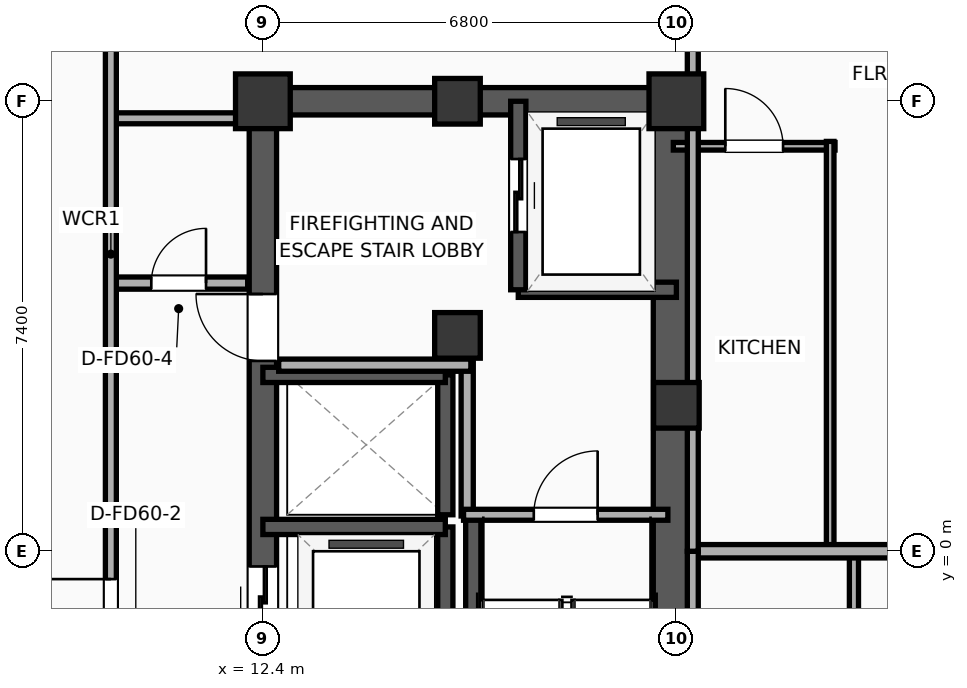
"""IFC4 building model, lengths in metres.
Left out: names, types, materials, properties, quantities, classifications, styles, units other than length and angle.
Written with IfcOpenShell. Run it as: python <this file> out.ifc"""

import sys

from ifc_helpers import new_model, si_unit, direction, frame, frame_2d, origin, origin_2d, place, context, subcontext, project, spatial, rectangle, extrude, element, fill, save


model = new_model("IFC4")
c1 = context("Model", 3, precision=1e-05, world=origin(), true_north=direction((0.0, 1.0)))
c2 = subcontext(c1, "Body", "Model", "MODEL_VIEW")
j1 = project(units=[si_unit("LENGTHUNIT", "METRE"), si_unit("PLANEANGLEUNIT", "RADIAN")], contexts=[c1])
p1 = place(None, origin())
s1 = spatial("IfcSite", under=j1, at=p1, CompositionType="ELEMENT")
p2 = place(p1, origin())
s2 = spatial("IfcBuilding", under=s1, at=p2, CompositionType="ELEMENT")
p3 = place(p2, frame((0.0, 0.0, 171.6)))
s3 = spatial("IfcBuildingStorey", under=s2, at=p3, CompositionType="ELEMENT", Elevation=171.6)
p4 = place(p3, frame((15.6, 3.55, 0.0), z_axis=(0.0, 0.0, 1.0), x_axis=(1.0, 0.0, 0.0)))
e1 = element("IfcColumn", 1, at=p4, inside=s3, PredefinedType="COLUMN", context=c2, shape_type="SweptSolid", body=[
    extrude(rectangle(XDim=0.75, YDim=0.75, at=origin_2d()), origin(), (0.0, 0.0, 1.0), 3.9),
])
p5 = place(p3, frame((12.4, 7.4, 0.0), z_axis=(0.0, 0.0, 1.0), x_axis=(1.0, 0.0, 0.0)))
e2 = element("IfcColumn", 2, at=p5, inside=s3, PredefinedType="COLUMN", context=c2, shape_type="SweptSolid", body=[
    extrude(rectangle(XDim=0.9, YDim=0.9, at=origin_2d()), origin(), (0.0, 0.0, 1.0), 3.9),
])
for number, where, z_axis, x_axis in (
    (3, (15.6, 7.4, 0.0), (0.0, 0.0, 1.0), (1.0, 0.0, 0.0)),
    (4, (19.2, 2.4, 0.0), (0.0, 0.0, 1.0), (1.0, 0.0, 0.0)),
):
    element("IfcColumn", number, at=place(p3, frame(where, z_axis=z_axis, x_axis=x_axis)), inside=s3, PredefinedType="COLUMN", context=c2, shape_type="SweptSolid", body=[
        extrude(rectangle(XDim=0.75, YDim=0.75, at=origin_2d()), origin(), (0.0, 0.0, 1.0), 3.9),
    ])
p6 = place(p3, frame((19.2, 7.4, 0.0), z_axis=(0.0, 0.0, 1.0), x_axis=(1.0, 0.0, 0.0)))
e5 = element("IfcColumn", 5, at=p6, inside=s3, PredefinedType="COLUMN", context=c2, shape_type="SweptSolid", body=[
    extrude(rectangle(XDim=0.9, YDim=0.9, at=origin_2d()), origin(), (0.0, 0.0, 1.0), 3.9),
])
p7 = place(p3, frame((12.175, 7.4, 0.0), z_axis=(0.0, 0.0, 1.0), x_axis=(1.0, 0.0, 0.0)))
e6 = element("IfcWall", 6, at=p7, inside=s3, PredefinedType="SHEAR", context=c2, shape_type="SweptSolid", body=[
    extrude(rectangle(XDim=7.25, YDim=0.45, at=frame_2d((3.625, 0.0))), origin(), (0.0, 0.0, 1.0), 3.65),
])
p8 = place(p3, frame((12.4, -7.4, 0.0), z_axis=(0.0, 0.0, 1.0), x_axis=(0.0, 1.0, 0.0)))
e7 = element("IfcWall", 7, at=p8, inside=s3, PredefinedType="SHEAR", context=c2, shape_type="SweptSolid", body=[
    extrude(rectangle(XDim=14.8, YDim=0.45, at=frame_2d((7.4, 0.0))), origin(), (0.0, 0.0, 1.0), 3.65),
])
p9 = place(p8, frame((3.45, 0.0, 0.0)))
e8 = element("IfcOpeningElement", 8, at=p9, cuts=e7, PredefinedType="OPENING", context=c2, shape_type="SweptSolid", body=[
    extrude(rectangle(XDim=1.1, YDim=2.05, at=frame_2d((0.55, 1.025))), frame((0.0, 0.235, 0.0), z_axis=(0.0, -1.0, 0.0), x_axis=(1.0, 0.0, 0.0)), (0.0, 0.0, 1.0), 0.47),
])
p10 = place(p8, frame((6.05, 0.0, 0.0)))
e9 = element("IfcOpeningElement", 9, at=p10, cuts=e7, PredefinedType="OPENING", context=c2, shape_type="SweptSolid", body=[
    extrude(rectangle(XDim=1.1, YDim=2.05, at=frame_2d((0.55, 1.025))), frame((0.0, 0.235, 0.0), z_axis=(0.0, -1.0, 0.0), x_axis=(1.0, 0.0, 0.0)), (0.0, 0.0, 1.0), 0.47),
])
p11 = place(p8, frame((10.53, 0.0, 0.0)))
e10 = element("IfcOpeningElement", 10, at=p11, cuts=e7, PredefinedType="OPENING", context=c2, shape_type="SweptSolid", body=[
    extrude(rectangle(XDim=1.1, YDim=2.05, at=frame_2d((0.55, 1.025))), frame((0.0, 0.235, 0.0), z_axis=(0.0, -1.0, 0.0), x_axis=(1.0, 0.0, 0.0)), (0.0, 0.0, 1.0), 0.47),
])
p12 = place(p8, frame((1.0, 0.0, 0.0)))
e11 = element("IfcOpeningElement", 11, at=p12, cuts=e7, PredefinedType="OPENING", context=c2, shape_type="SweptSolid", body=[
    extrude(rectangle(XDim=0.9, YDim=2.05, at=frame_2d((0.45, 1.025))), frame((0.0, 0.235, 0.0), z_axis=(0.0, -1.0, 0.0), x_axis=(1.0, 0.0, 0.0)), (0.0, 0.0, 1.0), 0.47),
])
p13 = place(p3, frame((19.145, -7.4, 0.0), z_axis=(0.0, 0.0, 1.0), x_axis=(0.0, 1.0, 0.0)))
e12 = element("IfcWall", 12, at=p13, inside=s3, PredefinedType="SHEAR", context=c2, shape_type="SweptSolid", body=[
    extrude(rectangle(XDim=14.8, YDim=0.65, at=frame_2d((7.4, 0.0))), origin(), (0.0, 0.0, 1.0), 3.65),
])
p14 = place(p3, frame((15.86, -7.085, 0.0), z_axis=(0.0, 0.0, 1.0), x_axis=(0.0, 1.0, 0.0)))
e13 = element("IfcWall", 13, at=p14, inside=s3, PredefinedType="SOLIDWALL", context=c2, shape_type="SweptSolid", body=[
    extrude(rectangle(XDim=7.685, YDim=0.25, at=frame_2d((3.843, 0.0))), origin(), (0.0, 0.0, 1.0), 3.65),
])
p15 = place(p3, frame((16.6, 4.3, 0.0), z_axis=(0.0, 0.0, 1.0), x_axis=(1.0, 0.0, 0.0)))
e14 = element("IfcWall", 14, at=p15, inside=s3, PredefinedType="SOLIDWALL", context=c2, shape_type="SweptSolid", body=[
    extrude(rectangle(XDim=2.6, YDim=0.25, at=frame_2d((1.3, 0.0))), origin(), (0.0, 0.0, 1.0), 3.65),
])
p16 = place(p3, frame((16.6, 7.4, 0.0), z_axis=(0.0, 0.0, 1.0), x_axis=(0.0, -1.0, 0.0)))
e15 = element("IfcWall", 15, at=p16, inside=s3, PredefinedType="SOLIDWALL", context=c2, shape_type="SweptSolid", body=[
    extrude(rectangle(XDim=3.1, YDim=0.25, at=frame_2d((1.55, 0.0))), origin(), (0.0, 0.0, 1.0), 3.65),
])
p17 = place(p16, frame((0.95, 0.0, 0.0)))
e16 = element("IfcOpeningElement", 16, at=p17, cuts=e15, PredefinedType="OPENING", context=c2, shape_type="SweptSolid", body=[
    extrude(rectangle(XDim=1.2, YDim=2.05, at=frame_2d((0.6, 1.025))), frame((0.0, 0.135, 0.0), z_axis=(0.0, -1.0, 0.0), x_axis=(1.0, 0.0, 0.0)), (0.0, 0.0, 1.0), 0.27),
])
p18 = place(p3, frame((15.4, -2.0, 0.0), z_axis=(0.0, 0.0, 1.0), x_axis=(0.0, 1.0, 0.0)))
e17 = element("IfcWall", 17, at=p18, inside=s3, PredefinedType="SOLIDWALL", context=c2, shape_type="SweptSolid", body=[
    extrude(rectangle(XDim=2.4, YDim=0.25, at=frame_2d((1.2, 0.0))), origin(), (0.0, 0.0, 1.0), 3.65),
])
p19 = place(p3, frame((15.4, 0.4, 0.0), z_axis=(0.0, 0.0, 1.0), x_axis=(-1.0, 0.0, 0.0)))
e18 = element("IfcWall", 18, at=p19, inside=s3, PredefinedType="SOLIDWALL", context=c2, shape_type="SweptSolid", body=[
    extrude(rectangle(XDim=3.0, YDim=0.25, at=frame_2d((1.5, 0.0))), origin(), (0.0, 0.0, 1.0), 3.65),
])
p20 = place(p3, frame((15.4, 0.6, 0.0), z_axis=(0.0, 0.0, 1.0), x_axis=(0.0, 1.0, 0.0)))
e19 = element("IfcWall", 19, at=p20, inside=s3, PredefinedType="SOLIDWALL", context=c2, shape_type="SweptSolid", body=[
    extrude(rectangle(XDim=2.3, YDim=0.25, at=frame_2d((1.15, 0.0))), origin(), (0.0, 0.0, 1.0), 3.65),
])
p21 = place(p3, frame((15.4, 2.9, 0.0), z_axis=(0.0, 0.0, 1.0), x_axis=(-1.0, 0.0, 0.0)))
e20 = element("IfcWall", 20, at=p21, inside=s3, PredefinedType="SOLIDWALL", context=c2, shape_type="SweptSolid", body=[
    extrude(rectangle(XDim=3.0, YDim=0.25, at=frame_2d((1.5, 0.0))), origin(), (0.0, 0.0, 1.0), 3.65),
])
p22 = place(p3, frame((15.76, 0.58, 0.0), z_axis=(0.0, 0.0, 1.0), x_axis=(0.0, 1.0, 0.0)))
e21 = element("IfcWall", 21, at=p22, inside=s3, PredefinedType="PARTITIONING", context=c2, shape_type="SweptSolid", body=[
    extrude(rectangle(XDim=2.52, YDim=0.2, at=frame_2d((1.26, 0.0))), origin(), (0.0, 0.0, 1.0), 3.65),
])
p23 = place(p3, frame((12.66, 3.06, 0.0), z_axis=(0.0, 0.0, 1.0), x_axis=(1.0, 0.0, 0.0)))
e22 = element("IfcWall", 22, at=p23, inside=s3, PredefinedType="PARTITIONING", context=c2, shape_type="SweptSolid", body=[
    extrude(rectangle(XDim=3.16, YDim=0.2, at=frame_2d((1.58, 0.0))), origin(), (0.0, 0.0, 1.0), 3.65),
])
p24 = place(p3, frame((15.7, 0.6, 0.0), z_axis=(0.0, 0.0, 1.0), x_axis=(1.0, 0.0, 0.0)))
e23 = element("IfcWall", 23, at=p24, inside=s3, PredefinedType="PARTITIONING", context=c2, shape_type="SweptSolid", body=[
    extrude(rectangle(XDim=3.36, YDim=0.18, at=frame_2d((1.68, 0.0))), origin(), (0.0, 0.0, 1.0), 3.65),
])
p25 = place(p24, frame((1.155, 0.0, 0.0)))
e24 = element("IfcOpeningElement", 24, at=p25, cuts=e23, PredefinedType="OPENING", context=c2, shape_type="SweptSolid", body=[
    extrude(rectangle(XDim=1.05, YDim=2.05, at=frame_2d((0.525, 1.025))), frame((0.0, 0.1, 0.0), z_axis=(0.0, -1.0, 0.0), x_axis=(1.0, 0.0, 0.0)), (0.0, 0.0, 1.0), 0.2),
])
p26 = place(p3, frame((9.88, 4.41, 0.0), z_axis=(0.0, 0.0, 1.0), x_axis=(1.0, 0.0, 0.0)))
e25 = element("IfcWall", 25, at=p26, inside=s3, PredefinedType="PARTITIONING", context=c2, shape_type="SweptSolid", body=[
    extrude(rectangle(XDim=2.27, YDim=0.2, at=frame_2d((1.135, 0.0))), origin(), (0.0, 0.0, 1.0), 3.65),
])
p27 = place(p26, frame((0.685, 0.0, 0.0)))
e26 = element("IfcOpeningElement", 26, at=p27, cuts=e25, PredefinedType="OPENING", context=c2, shape_type="SweptSolid", body=[
    extrude(rectangle(XDim=0.9, YDim=2.05, at=frame_2d((0.45, 1.025))), frame((0.0, 0.11, 0.0), z_axis=(0.0, -1.0, 0.0), x_axis=(1.0, 0.0, 0.0)), (0.0, 0.0, 1.0), 0.22),
])
p28 = place(p3, frame((9.88, 7.12, 0.0), z_axis=(0.0, 0.0, 1.0), x_axis=(1.0, 0.0, 0.0)))
e27 = element("IfcWall", 27, at=p28, inside=s3, PredefinedType="PARTITIONING", context=c2, shape_type="SweptSolid", body=[
    extrude(rectangle(XDim=2.27, YDim=0.18, at=frame_2d((1.135, 0.0))), origin(), (0.0, 0.0, 1.0), 3.65),
])
p29 = place(p3, frame((9.9, -10.08, 0.0), z_axis=(0.0, 0.0, 1.0), x_axis=(0.0, 1.0, 0.0)))
e28 = element("IfcWall", 28, at=p29, inside=s3, PredefinedType="PARTITIONING", context=c2, shape_type="SweptSolid", body=[
    extrude(rectangle(XDim=20.16, YDim=0.18, at=frame_2d((10.08, 0.0))), origin(), (0.0, 0.0, 1.0), 3.65),
])
p30 = place(p29, frame((8.522, 0.0, 0.0)))
e29 = element("IfcOpeningElement", 29, at=p30, cuts=e28, PredefinedType="OPENING", context=c2, shape_type="SweptSolid", body=[
    extrude(rectangle(XDim=1.1, YDim=2.05, at=frame_2d((0.55, 1.025))), frame((0.0, 0.1, 0.0), z_axis=(0.0, -1.0, 0.0), x_axis=(1.0, 0.0, 0.0)), (0.0, 0.0, 1.0), 0.2),
])
p31 = place(p3, frame((22.12, -6.74, 0.0), z_axis=(0.0, 0.0, 1.0), x_axis=(0.0, 1.0, 0.0)))
e30 = element("IfcWall", 30, at=p31, inside=s3, PredefinedType="PLUMBINGWALL", context=c2, shape_type="SweptSolid", body=[
    extrude(rectangle(XDim=6.72, YDim=0.15, at=frame_2d((3.36, 0.0))), origin(), (0.0, 0.0, 1.0), 3.65),
])
p32 = place(p3, frame((19.15, 6.66, 0.0), z_axis=(0.0, 0.0, 1.0), x_axis=(1.0, 0.0, 0.0)))
e31 = element("IfcWall", 31, at=p32, inside=s3, PredefinedType="PARTITIONING", context=c2, shape_type="SweptSolid", body=[
    extrude(rectangle(XDim=2.659, YDim=0.125, at=frame_2d((1.33, 0.0))), origin(), (0.0, 0.0, 1.0), 3.65),
])
p33 = place(p32, frame((0.854, 0.0, 0.0)))
e32 = element("IfcOpeningElement", 32, at=p33, cuts=e31, PredefinedType="OPENING", context=c2, shape_type="SweptSolid", body=[
    extrude(rectangle(XDim=0.95, YDim=2.05, at=frame_2d((0.475, 1.025))), frame((0.0, 0.073, 0.0), z_axis=(0.0, -1.0, 0.0), x_axis=(1.0, 0.0, 0.0)), (0.0, 0.0, 1.0), 0.145),
])
p34 = place(p3, frame((21.729, 0.02, 0.0), z_axis=(0.0, 0.0, 1.0), x_axis=(0.0, 1.0, 0.0)))
e33 = element("IfcWall", 33, at=p34, inside=s3, PredefinedType="PARTITIONING", context=c2, shape_type="SweptSolid", body=[
    extrude(rectangle(XDim=6.72, YDim=0.125, at=frame_2d((3.36, 0.0))), origin(), (0.0, 0.0, 1.0), 3.65),
])
p35 = place(p3, frame((19.47, 0.0, 0.0), z_axis=(0.0, 0.0, 1.0), x_axis=(1.0, 0.0, 0.0)))
e34 = element("IfcWall", 34, at=p35, inside=s3, PredefinedType="PARTITIONING", context=c2, shape_type="SweptSolid", body=[
    extrude(rectangle(XDim=7.06, YDim=0.22, at=frame_2d((3.53, 0.0))), origin(), (0.0, 0.0, 1.0), 3.65),
])
p36 = place(p3, frame((19.47, -18.559, 0.0), z_axis=(0.0, 0.0, 1.0), x_axis=(0.0, 1.0, 0.0)))
e35 = element("IfcWall", 35, at=p36, inside=s3, PredefinedType="PARTITIONING", context=c2, shape_type="SweptSolid", body=[
    extrude(rectangle(XDim=18.559, YDim=0.18, at=frame_2d((9.279, 0.0))), origin(), (0.0, 0.0, 1.0), 3.65),
])
p37 = place(p36, frame((7.378, 0.0, 0.0)))
e36 = element("IfcOpeningElement", 36, at=p37, cuts=e35, PredefinedType="OPENING", context=c2, shape_type="SweptSolid", body=[
    extrude(rectangle(XDim=0.9, YDim=2.05, at=frame_2d((0.45, 1.025))), frame((0.0, 0.1, 0.0), z_axis=(0.0, -1.0, 0.0), x_axis=(1.0, 0.0, 0.0)), (0.0, 0.0, 1.0), 0.2),
])
p38 = place(p3, frame((19.47, 0.0, 0.0), z_axis=(0.0, 0.0, 1.0), x_axis=(0.0, 1.0, 0.0)))
e37 = element("IfcWall", 37, at=p38, inside=s3, PredefinedType="PARTITIONING", context=c2, shape_type="SweptSolid", body=[
    extrude(rectangle(XDim=22.124, YDim=0.18, at=frame_2d((11.062, 0.0))), origin(), (0.0, 0.0, 1.0), 3.04),
])
p39 = place(p38, frame((10.28, 0.0, 0.0)))
e38 = element("IfcOpeningElement", 38, at=p39, cuts=e37, PredefinedType="OPENING", context=c2, shape_type="SweptSolid", body=[
    extrude(rectangle(XDim=0.9, YDim=2.05, at=frame_2d((0.45, 1.025))), frame((0.0, 0.1, 0.0), z_axis=(0.0, -1.0, 0.0), x_axis=(1.0, 0.0, 0.0)), (0.0, 0.0, 1.0), 0.2),
])
p40 = place(p17, origin())
e39 = element("IfcDoor", 39, at=p40, inside=s3, OperationType="SLIDING_TO_LEFT", PredefinedType="DOOR", context=c2, shape_type="SweptSolid", body=[
    extrude(rectangle(XDim=1.2, YDim=2.05, at=frame_2d((0.6, 1.025))), frame((0.0, 0.025, 0.0), z_axis=(0.0, -1.0, 0.0), x_axis=(1.0, 0.0, 0.0)), (0.0, 0.0, 1.0), 0.05),
])
fill(e16, e39)
p41 = place(p10, origin())
e40 = element("IfcDoor", 40, at=p41, inside=s3, OperationType="SLIDING_TO_LEFT", PredefinedType="DOOR", context=c2, shape_type="SweptSolid", body=[
    extrude(rectangle(XDim=1.1, YDim=2.05, at=frame_2d((0.55, 1.025))), frame((0.0, 0.025, 0.0), z_axis=(0.0, -1.0, 0.0), x_axis=(1.0, 0.0, 0.0)), (0.0, 0.0, 1.0), 0.05),
])
fill(e9, e40)
p42 = place(p25, origin())
e41 = element("IfcDoor", 41, at=p42, inside=s3, OperationType="SINGLE_SWING_RIGHT", PredefinedType="DOOR", context=c2, shape_type="SweptSolid", body=[
    extrude(rectangle(XDim=1.05, YDim=2.05, at=frame_2d((0.525, 1.025))), frame((0.0, 0.025, 0.0), z_axis=(0.0, -1.0, 0.0), x_axis=(1.0, 0.0, 0.0)), (0.0, 0.0, 1.0), 0.05),
])
fill(e24, e41)
p43 = place(p27, origin())
e42 = element("IfcDoor", 42, at=p43, inside=s3, OperationType="SINGLE_SWING_RIGHT", PredefinedType="DOOR", context=c2, shape_type="SweptSolid", body=[
    extrude(rectangle(XDim=0.9, YDim=2.05, at=frame_2d((0.45, 1.025))), frame((0.0, 0.025, 0.0), z_axis=(0.0, -1.0, 0.0), x_axis=(1.0, 0.0, 0.0)), (0.0, 0.0, 1.0), 0.05),
])
fill(e26, e42)
p44 = place(p30, origin())
e43 = element("IfcDoor", 43, at=p44, inside=s3, OperationType="SINGLE_SWING_RIGHT", PredefinedType="DOOR", context=c2, shape_type="SweptSolid", body=[
    extrude(rectangle(XDim=1.1, YDim=2.05, at=frame_2d((0.55, 1.025))), frame((0.0, 0.025, 0.0), z_axis=(0.0, -1.0, 0.0), x_axis=(1.0, 0.0, 0.0)), (0.0, 0.0, 1.0), 0.05),
])
fill(e29, e43)
p45 = place(p33, origin())
e44 = element("IfcDoor", 44, at=p45, inside=s3, OperationType="SINGLE_SWING_LEFT", PredefinedType="DOOR", context=c2, shape_type="SweptSolid", body=[
    extrude(rectangle(XDim=0.95, YDim=2.05, at=frame_2d((0.475, 1.025))), frame((0.0, 0.025, 0.0), z_axis=(0.0, -1.0, 0.0), x_axis=(1.0, 0.0, 0.0)), (0.0, 0.0, 1.0), 0.05),
])
fill(e32, e44)
p46 = place(p11, origin())
e45 = element("IfcDoor", 45, at=p46, inside=s3, OperationType="SINGLE_SWING_RIGHT", PredefinedType="DOOR", context=c2, shape_type="SweptSolid", body=[
    extrude(rectangle(XDim=1.1, YDim=2.05, at=frame_2d((0.55, 1.025))), frame((0.0, 0.025, 0.0), z_axis=(0.0, -1.0, 0.0), x_axis=(1.0, 0.0, 0.0)), (0.0, 0.0, 1.0), 0.05),
])
fill(e10, e45)
save(model, sys.argv[1])
